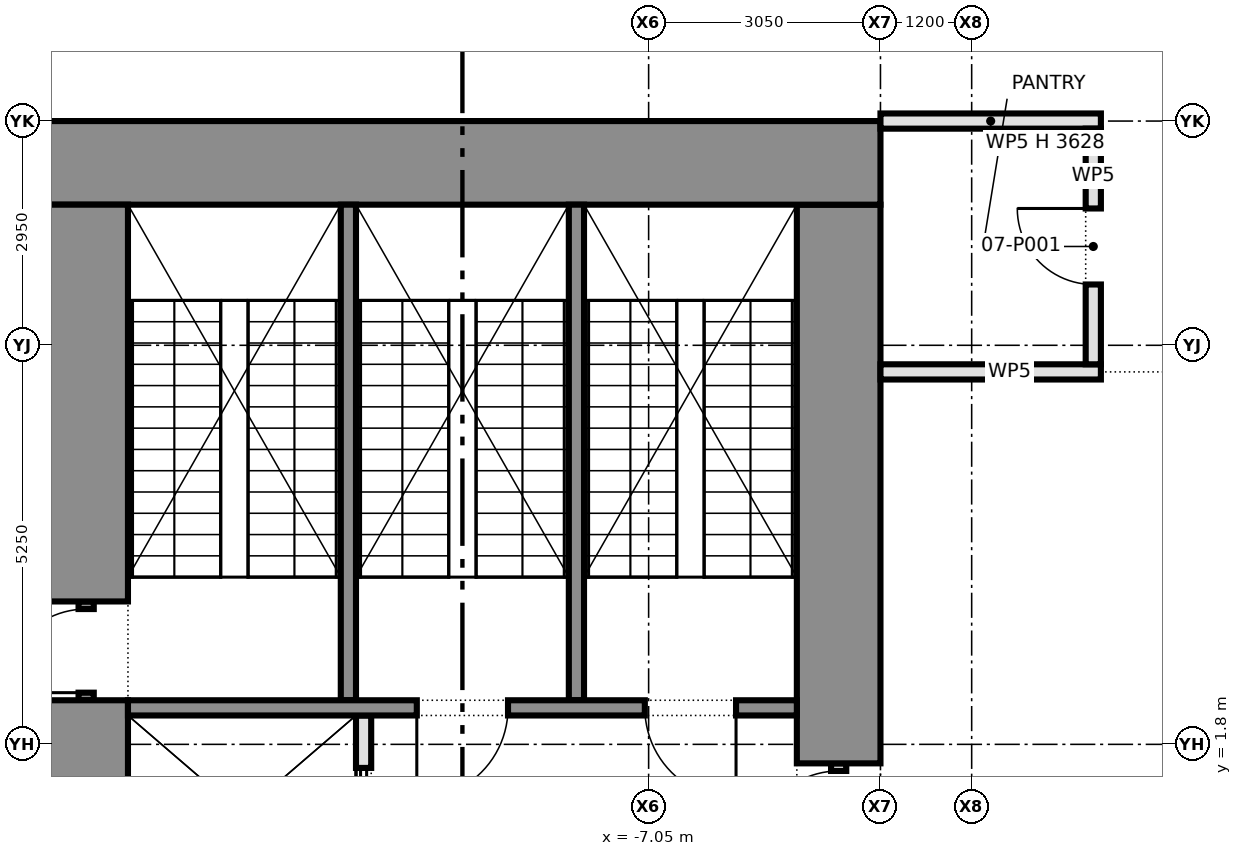
"""IFC4 building model, lengths in metres.
Left out: names, types, materials, properties, quantities, classifications, styles, units other than length and angle.
Written with IfcOpenShell. Run it as: python <this file> out.ifc"""

import sys

from ifc_helpers import new_model, si_unit, direction, frame, frame_2d, origin, place, context, subcontext, project, spatial, rectangle, extrude, element, fill, save


model = new_model("IFC4")
c1 = context("Model", 3, precision=1e-05, world=origin(), true_north=direction((0.0, 1.0)))
c2 = subcontext(c1, "Body", "Model", "MODEL_VIEW")
j1 = project(units=[si_unit("LENGTHUNIT", "METRE"), si_unit("PLANEANGLEUNIT", "RADIAN")], contexts=[c1])
p1 = place(None, origin())
s1 = spatial("IfcSite", under=j1, at=p1, CompositionType="ELEMENT")
p2 = place(p1, origin())
s2 = spatial("IfcBuilding", under=s1, at=p2, CompositionType="ELEMENT")
p3 = place(p2, frame((0.0, 0.0, 30.5)))
s3 = spatial("IfcBuildingStorey", under=s2, at=p3, CompositionType="ELEMENT", Elevation=30.5)
p4 = place(p3, frame((-15.0, 9.45, 0.0), z_axis=(0.0, 0.0, 1.0), x_axis=(1.0, 0.0, 0.0)))
e1 = element("IfcWall", 1, at=p4, inside=s3, PredefinedType="SHEAR", context=c2, shape_type="SweptSolid", body=[
    extrude(rectangle(XDim=11.0, YDim=1.1, at=frame_2d((5.5, 0.0))), origin(), (0.0, 0.0, 1.0), 4.575),
])
p5 = place(p3, frame((-14.45, -3.75, 0.0), z_axis=(0.0, 0.0, 1.0), x_axis=(0.0, 1.0, 0.0)))
e2 = element("IfcWall", 2, at=p5, inside=s3, PredefinedType="SHEAR", context=c2, shape_type="SweptSolid", body=[
    extrude(rectangle(XDim=6.13, YDim=1.1, at=frame_2d((3.065, 0.0))), origin(), (0.0, 0.0, 1.0), 4.575),
])
p6 = place(p3, frame((-14.45, 2.38, 0.0), z_axis=(0.0, 0.0, 1.0), x_axis=(0.0, 1.0, 0.0)))
e3 = element("IfcWall", 3, at=p6, inside=s3, PredefinedType="SHEAR", context=c2, shape_type="SweptSolid", body=[
    extrude(rectangle(XDim=1.3, YDim=0.2, at=frame_2d((0.65, 0.0))), origin(), (0.0, 0.0, 1.0), 2.4),
])
p7 = place(p6, frame((0.1, 0.0, 0.0)))
e4 = element("IfcOpeningElement", 4, at=p7, cuts=e3, PredefinedType="OPENING", context=c2, shape_type="SweptSolid", body=[
    extrude(rectangle(XDim=1.1, YDim=2.1, at=frame_2d((0.55, 1.05))), frame((0.0, 0.11, 0.0), z_axis=(0.0, -1.0, 0.0), x_axis=(1.0, 0.0, 0.0)), (0.0, 0.0, 1.0), 0.22),
])
p8 = place(p3, frame((-14.45, 3.68, 0.0), z_axis=(0.0, 0.0, 1.0), x_axis=(0.0, 1.0, 0.0)))
e5 = element("IfcWall", 5, at=p8, inside=s3, PredefinedType="SHEAR", context=c2, shape_type="SweptSolid", body=[
    extrude(rectangle(XDim=5.22, YDim=1.1, at=frame_2d((2.61, 0.0))), origin(), (0.0, 0.0, 1.0), 4.575),
])
p9 = place(p3, frame((-4.55, 0.25, 0.0), z_axis=(0.0, 0.0, 1.0), x_axis=(0.0, 1.0, 0.0)))
e6 = element("IfcWall", 6, at=p9, inside=s3, PredefinedType="PARTITIONING", context=c2, shape_type="SweptSolid", body=[
    extrude(rectangle(XDim=1.3, YDim=0.2, at=frame_2d((0.65, 0.0))), origin(), (0.0, 0.0, 1.0), 2.4),
])
p10 = place(p9, frame((0.1, 0.0, 0.0)))
e7 = element("IfcOpeningElement", 7, at=p10, cuts=e6, PredefinedType="OPENING", context=c2, shape_type="SweptSolid", body=[
    extrude(rectangle(XDim=1.1, YDim=2.1, at=frame_2d((0.55, 1.05))), frame((0.0, 0.11, 0.0), z_axis=(0.0, -1.0, 0.0), x_axis=(1.0, 0.0, 0.0)), (0.0, 0.0, 1.0), 0.22),
])
p11 = place(p3, frame((-4.55, 1.55, 0.0), z_axis=(0.0, 0.0, 1.0), x_axis=(0.0, 1.0, 0.0)))
e8 = element("IfcWall", 8, at=p11, inside=s3, PredefinedType="SHEAR", context=c2, shape_type="SweptSolid", body=[
    extrude(rectangle(XDim=7.35, YDim=1.1, at=frame_2d((3.675, 0.0))), origin(), (0.0, 0.0, 1.0), 4.575),
])
p12 = place(p3, frame((-10.8, -0.4, 0.0), z_axis=(0.0, 0.0, 1.0), x_axis=(0.0, 1.0, 0.0)))
e9 = element("IfcWall", 9, at=p12, inside=s3, PredefinedType="PARTITIONING", context=c2, shape_type="SweptSolid", body=[
    extrude(rectangle(XDim=2.58, YDim=0.2, at=frame_2d((1.29, 0.0))), origin(), (0.0, 0.0, 1.0), 4.575),
])
p13 = place(p12, frame((0.69, 0.0, 0.0)))
e10 = element("IfcOpeningElement", 10, at=p13, cuts=e9, PredefinedType="OPENING", context=c2, shape_type="SweptSolid", body=[
    extrude(rectangle(XDim=1.2, YDim=2.1, at=frame_2d((0.6, 1.05))), frame((0.0, 0.11, 0.0), z_axis=(0.0, -1.0, 0.0), x_axis=(1.0, 0.0, 0.0)), (0.0, 0.0, 1.0), 0.22),
])
p14 = place(p3, frame((-13.9, 2.28, 0.0), z_axis=(0.0, 0.0, 1.0), x_axis=(1.0, 0.0, 0.0)))
e11 = element("IfcWall", 11, at=p14, inside=s3, PredefinedType="SHEAR", context=c2, shape_type="SweptSolid", body=[
    extrude(rectangle(XDim=8.8, YDim=0.2, at=frame_2d((4.4, 0.0))), origin(), (0.0, 0.0, 1.0), 4.575),
])
p15 = place(p14, frame((3.8, 0.0, 0.0)))
e12 = element("IfcOpeningElement", 12, at=p15, cuts=e11, PredefinedType="OPENING", context=c2, shape_type="SweptSolid", body=[
    extrude(rectangle(XDim=1.2, YDim=2.1, at=frame_2d((0.6, 1.05))), frame((0.0, 0.11, 0.0), z_axis=(0.0, -1.0, 0.0), x_axis=(1.0, 0.0, 0.0)), (0.0, 0.0, 1.0), 0.22),
])
p16 = place(p14, frame((6.8, 0.0, 0.0)))
e13 = element("IfcOpeningElement", 13, at=p16, cuts=e11, PredefinedType="OPENING", context=c2, shape_type="SweptSolid", body=[
    extrude(rectangle(XDim=1.2, YDim=2.1, at=frame_2d((0.6, 1.05))), frame((0.0, 0.11, 0.0), z_axis=(0.0, -1.0, 0.0), x_axis=(1.0, 0.0, 0.0)), (0.0, 0.0, 1.0), 0.22),
])
for number, where, z_axis, x_axis in (
    (14, (-11.0, 2.38, 0.0), (0.0, 0.0, 1.0), (0.0, 1.0, 0.0)),
    (15, (-8.0, 2.38, 0.0), (0.0, 0.0, 1.0), (0.0, 1.0, 0.0)),
):
    element("IfcWall", number, at=place(p3, frame(where, z_axis=z_axis, x_axis=x_axis)), inside=s3, PredefinedType="SHEAR", context=c2, shape_type="SweptSolid", body=[
        extrude(rectangle(XDim=6.52, YDim=0.2, at=frame_2d((3.26, 0.0))), origin(), (0.0, 0.0, 1.0), 4.575),
    ])
p17 = place(p3, frame((-4.0, 6.7, 0.0), z_axis=(0.0, 0.0, 1.0), x_axis=(1.0, 0.0, 0.0)))
e16 = element("IfcWall", 16, at=p17, inside=s3, PredefinedType="PARTITIONING", context=c2, shape_type="SweptSolid", body=[
    extrude(rectangle(XDim=2.9, YDim=0.2, at=frame_2d((1.45, 0.0))), origin(), (0.0, 0.0, 1.0), 4.575),
])
p18 = place(p3, frame((-4.0, 10.0, 0.0), z_axis=(0.0, 0.0, 1.0), x_axis=(1.0, 0.0, 0.0)))
e17 = element("IfcWall", 17, at=p18, inside=s3, PredefinedType="PARTITIONING", context=c2, shape_type="SweptSolid", body=[
    extrude(rectangle(XDim=2.9, YDim=0.2, at=frame_2d((1.45, 0.0))), origin(), (0.0, 0.0, 1.0), 3.628),
])
p19 = place(p3, frame((-1.2, 6.8, 0.0), z_axis=(0.0, 0.0, 1.0), x_axis=(0.0, 1.0, 0.0)))
e18 = element("IfcWall", 18, at=p19, inside=s3, PredefinedType="PARTITIONING", context=c2, shape_type="SweptSolid", body=[
    extrude(rectangle(XDim=3.1, YDim=0.2, at=frame_2d((1.55, 0.0))), origin(), (0.0, 0.0, 1.0), 4.575),
])
p20 = place(p19, frame((1.05, 0.0, 0.0)))
e19 = element("IfcOpeningElement", 19, at=p20, cuts=e18, PredefinedType="OPENING", context=c2, shape_type="SweptSolid", body=[
    extrude(rectangle(XDim=1.0, YDim=2.1, at=frame_2d((0.5, 1.05))), frame((0.0, 0.11, 0.0), z_axis=(0.0, -1.0, 0.0), x_axis=(1.0, 0.0, 0.0)), (0.0, 0.0, 1.0), 0.22),
])
p21 = place(p7, origin())
e20 = element("IfcDoor", 20, at=p21, inside=s3, OperationType="SINGLE_SWING_LEFT", PredefinedType="DOOR", context=c2, shape_type="SweptSolid", body=[
    extrude(rectangle(XDim=1.1, YDim=2.1, at=frame_2d((0.55, 1.05))), frame((0.0, 0.025, 0.0), z_axis=(0.0, -1.0, 0.0), x_axis=(1.0, 0.0, 0.0)), (0.0, 0.0, 1.0), 0.05),
])
fill(e4, e20)
p22 = place(p10, origin())
e21 = element("IfcDoor", 21, at=p22, inside=s3, OperationType="SINGLE_SWING_LEFT", PredefinedType="DOOR", context=c2, shape_type="SweptSolid", body=[
    extrude(rectangle(XDim=1.1, YDim=2.1, at=frame_2d((0.55, 1.05))), frame((0.0, 0.025, 0.0), z_axis=(0.0, -1.0, 0.0), x_axis=(1.0, 0.0, 0.0)), (0.0, 0.0, 1.0), 0.05),
])
fill(e7, e21)
p23 = place(p13, origin())
e22 = element("IfcDoor", 22, at=p23, inside=s3, OperationType="DOUBLE_DOOR_SLIDING", PredefinedType="DOOR", context=c2, shape_type="SweptSolid", body=[
    extrude(rectangle(XDim=1.2, YDim=2.1, at=frame_2d((0.6, 1.05))), frame((0.0, 0.025, 0.0), z_axis=(0.0, -1.0, 0.0), x_axis=(1.0, 0.0, 0.0)), (0.0, 0.0, 1.0), 0.05),
])
fill(e10, e22)
p24 = place(p15, frame((1.2, 0.0, 0.0), z_axis=(0.0, 0.0, 1.0), x_axis=(-1.0, 0.0, 0.0)))
e23 = element("IfcDoor", 23, at=p24, inside=s3, OperationType="SINGLE_SWING_RIGHT", PredefinedType="DOOR", context=c2, shape_type="SweptSolid", body=[
    extrude(rectangle(XDim=1.2, YDim=2.1, at=frame_2d((0.6, 1.05))), frame((0.0, 0.025, 0.0), z_axis=(0.0, -1.0, 0.0), x_axis=(1.0, 0.0, 0.0)), (0.0, 0.0, 1.0), 0.05),
])
fill(e12, e23)
p25 = place(p16, frame((1.2, 0.0, 0.0), z_axis=(0.0, 0.0, 1.0), x_axis=(-1.0, 0.0, 0.0)))
e24 = element("IfcDoor", 24, at=p25, inside=s3, OperationType="SINGLE_SWING_LEFT", PredefinedType="DOOR", context=c2, shape_type="SweptSolid", body=[
    extrude(rectangle(XDim=1.2, YDim=2.1, at=frame_2d((0.6, 1.05))), frame((0.0, 0.025, 0.0), z_axis=(0.0, -1.0, 0.0), x_axis=(1.0, 0.0, 0.0)), (0.0, 0.0, 1.0), 0.05),
])
fill(e13, e24)
p26 = place(p20, origin())
e25 = element("IfcDoor", 25, at=p26, inside=s3, OperationType="SINGLE_SWING_RIGHT", PredefinedType="DOOR", context=c2, shape_type="SweptSolid", body=[
    extrude(rectangle(XDim=1.0, YDim=2.1, at=frame_2d((0.5, 1.05))), frame((0.0, 0.025, 0.0), z_axis=(0.0, -1.0, 0.0), x_axis=(1.0, 0.0, 0.0)), (0.0, 0.0, 1.0), 0.05),
])
fill(e19, e25)
save(model, sys.argv[1])
